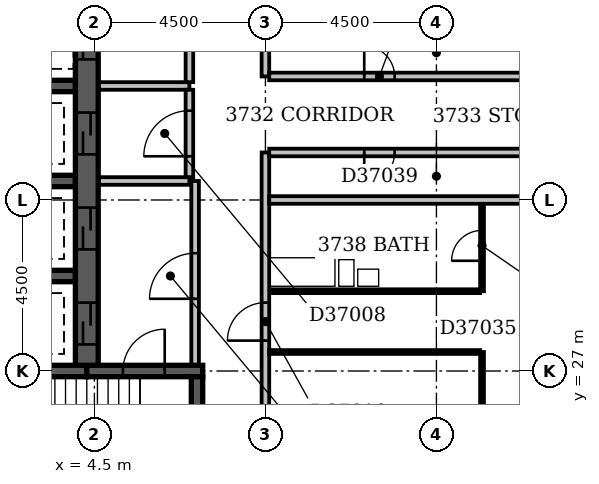
"""IFC4 building model, lengths in metres.
Left out: names, types, materials, properties, quantities, classifications, styles, units other than length and angle.
Written with IfcOpenShell. Run it as: python <this file> out.ifc"""

import sys

from ifc_helpers import new_model, si_unit, direction, frame, frame_2d, origin, place, context, subcontext, project, spatial, rectangle, extrude, element, fill, save


model = new_model("IFC4")
c1 = context("Model", 3, precision=1e-05, world=origin(), true_north=direction((0.0, 1.0)))
c2 = subcontext(c1, "Body", "Model", "MODEL_VIEW")
j1 = project(units=[si_unit("LENGTHUNIT", "METRE"), si_unit("PLANEANGLEUNIT", "RADIAN")], contexts=[c1])
p1 = place(None, origin())
s1 = spatial("IfcSite", under=j1, at=p1, CompositionType="ELEMENT")
p2 = place(p1, origin())
s2 = spatial("IfcBuilding", under=s1, at=p2, CompositionType="ELEMENT")
p3 = place(p2, frame((0.0, 0.0, 148.4)))
s3 = spatial("IfcBuildingStorey", under=s2, at=p3, CompositionType="ELEMENT", Elevation=148.4)
p4 = place(p3, frame((0.35, 27.0, -0.3), z_axis=(0.0, 0.0, 1.0), x_axis=(1.0, 0.0, 0.0)))
e1 = element("IfcWall", 1, at=p4, inside=s3, PredefinedType="SHEAR", context=c2, shape_type="SweptSolid", body=[
    extrude(rectangle(XDim=3.95, YDim=0.3, at=frame_2d((1.975, 0.0))), origin(), (0.0, 0.0, 1.0), 3.6),
])
for number, where, z_axis, x_axis in (
    (2, (0.8, 29.5, -0.3), (0.0, 0.0, 1.0), (1.0, 0.0, 0.0)),
    (3, (0.8, 32.0, -0.3), (0.0, 0.0, 1.0), (1.0, 0.0, 0.0)),
    (4, (0.8, 34.5, -0.3), (0.0, 0.0, 1.0), (1.0, 0.0, 0.0)),
):
    element("IfcWall", number, at=place(p3, frame(where, z_axis=z_axis, x_axis=x_axis)), inside=s3, PredefinedType="SHEAR", context=c2, shape_type="SweptSolid", body=[
        extrude(rectangle(XDim=3.2, YDim=0.3, at=frame_2d((1.6, 0.0))), origin(), (0.0, 0.0, 1.0), 3.6),
    ])
p5 = place(p3, frame((4.3, 27.0, -0.3), z_axis=(0.0, 0.0, 1.0), x_axis=(1.0, 0.0, 0.0)))
e5 = element("IfcWall", 5, at=p5, inside=s3, PredefinedType="SHEAR", context=c2, shape_type="SweptSolid", body=[
    extrude(rectangle(XDim=3.05, YDim=0.3, at=frame_2d((1.525, 0.0))), origin(), (0.0, 0.0, 1.0), 3.6),
])
p6 = place(p5, frame((0.95, 0.0, 0.3)))
e6 = element("IfcOpeningElement", 6, at=p6, cuts=e5, PredefinedType="OPENING", context=c2, shape_type="SweptSolid", body=[
    extrude(rectangle(XDim=1.1, YDim=2.1, at=frame_2d((0.55, 1.05))), frame((0.0, 0.162, 0.0), z_axis=(0.0, -1.0, 0.0), x_axis=(1.0, 0.0, 0.0)), (0.0, 0.0, 1.0), 0.324),
])
p7 = place(p3, frame((4.3, 27.15, -0.3), z_axis=(0.0, 0.0, 1.0), x_axis=(0.0, 1.0, 0.0)))
e7 = element("IfcWall", 7, at=p7, inside=s3, PredefinedType="SHEAR", context=c2, shape_type="SweptSolid", body=[
    extrude(rectangle(XDim=22.05, YDim=0.6, at=frame_2d((11.025, 0.0))), origin(), (0.0, 0.0, 1.0), 3.6),
])
p8 = place(p7, frame((3.05, 0.0, 0.3)))
e8 = element("IfcOpeningElement", 8, at=p8, cuts=e7, PredefinedType="OPENING", context=c2, shape_type="SweptSolid", body=[
    extrude(rectangle(XDim=1.1, YDim=2.1, at=frame_2d((0.55, 1.05))), frame((0.0, 0.312, 0.0), z_axis=(0.0, -1.0, 0.0), x_axis=(1.0, 0.0, 0.0)), (0.0, 0.0, 1.0), 0.624),
])
p9 = place(p7, frame((0.55, 0.0, 0.3)))
e9 = element("IfcOpeningElement", 9, at=p9, cuts=e7, PredefinedType="OPENING", context=c2, shape_type="SweptSolid", body=[
    extrude(rectangle(XDim=1.1, YDim=2.1, at=frame_2d((0.55, 1.05))), frame((0.0, 0.312, 0.0), z_axis=(0.0, -1.0, 0.0), x_axis=(1.0, 0.0, 0.0)), (0.0, 0.0, 1.0), 0.624),
])
p10 = place(p7, frame((20.55, 0.0, 0.3)))
e10 = element("IfcOpeningElement", 10, at=p10, cuts=e7, PredefinedType="OPENING", context=c2, shape_type="SweptSolid", body=[
    extrude(rectangle(XDim=1.1, YDim=2.1, at=frame_2d((0.55, 1.05))), frame((0.0, 0.312, 0.0), z_axis=(0.0, -1.0, 0.0), x_axis=(1.0, 0.0, 0.0)), (0.0, 0.0, 1.0), 0.624),
])
p11 = place(p7, frame((18.05, 0.0, 0.3)))
e11 = element("IfcOpeningElement", 11, at=p11, cuts=e7, PredefinedType="OPENING", context=c2, shape_type="SweptSolid", body=[
    extrude(rectangle(XDim=1.1, YDim=2.1, at=frame_2d((0.55, 1.05))), frame((0.0, 0.312, 0.0), z_axis=(0.0, -1.0, 0.0), x_axis=(1.0, 0.0, 0.0)), (0.0, 0.0, 1.0), 0.624),
])
p12 = place(p7, frame((15.55, 0.0, 0.3)))
e12 = element("IfcOpeningElement", 12, at=p12, cuts=e7, PredefinedType="OPENING", context=c2, shape_type="SweptSolid", body=[
    extrude(rectangle(XDim=1.1, YDim=2.1, at=frame_2d((0.55, 1.05))), frame((0.0, 0.312, 0.0), z_axis=(0.0, -1.0, 0.0), x_axis=(1.0, 0.0, 0.0)), (0.0, 0.0, 1.0), 0.624),
])
p13 = place(p7, frame((13.05, 0.0, 0.3)))
e13 = element("IfcOpeningElement", 13, at=p13, cuts=e7, PredefinedType="OPENING", context=c2, shape_type="SweptSolid", body=[
    extrude(rectangle(XDim=1.1, YDim=2.1, at=frame_2d((0.55, 1.05))), frame((0.0, 0.312, 0.0), z_axis=(0.0, -1.0, 0.0), x_axis=(1.0, 0.0, 0.0)), (0.0, 0.0, 1.0), 0.624),
])
p14 = place(p7, frame((10.55, 0.0, 0.3)))
e14 = element("IfcOpeningElement", 14, at=p14, cuts=e7, PredefinedType="OPENING", context=c2, shape_type="SweptSolid", body=[
    extrude(rectangle(XDim=1.1, YDim=2.1, at=frame_2d((0.55, 1.05))), frame((0.0, 0.312, 0.0), z_axis=(0.0, -1.0, 0.0), x_axis=(1.0, 0.0, 0.0)), (0.0, 0.0, 1.0), 0.624),
])
p15 = place(p7, frame((8.05, 0.0, 0.3)))
e15 = element("IfcOpeningElement", 15, at=p15, cuts=e7, PredefinedType="OPENING", context=c2, shape_type="SweptSolid", body=[
    extrude(rectangle(XDim=1.1, YDim=2.1, at=frame_2d((0.55, 1.05))), frame((0.0, 0.312, 0.0), z_axis=(0.0, -1.0, 0.0), x_axis=(1.0, 0.0, 0.0)), (0.0, 0.0, 1.0), 0.624),
])
p16 = place(p7, frame((5.55, 0.0, 0.3)))
e16 = element("IfcOpeningElement", 16, at=p16, cuts=e7, PredefinedType="OPENING", context=c2, shape_type="SweptSolid", body=[
    extrude(rectangle(XDim=1.1, YDim=2.1, at=frame_2d((0.55, 1.05))), frame((0.0, 0.312, 0.0), z_axis=(0.0, -1.0, 0.0), x_axis=(1.0, 0.0, 0.0)), (0.0, 0.0, 1.0), 0.624),
])
p17 = place(p3, frame((7.2, 22.65, -0.3), z_axis=(0.0, 0.0, 1.0), x_axis=(0.0, 1.0, 0.0)))
e17 = element("IfcWall", 17, at=p17, inside=s3, PredefinedType="SHEAR", context=c2, shape_type="SweptSolid", body=[
    extrude(rectangle(XDim=4.2, YDim=0.3, at=frame_2d((2.1, 0.0))), origin(), (0.0, 0.0, 1.0), 3.6),
])
p18 = place(p17, frame((0.8, 0.0, 0.3)))
e18 = element("IfcOpeningElement", 18, at=p18, cuts=e17, PredefinedType="OPENING", context=c2, shape_type="SweptSolid", body=[
    extrude(rectangle(XDim=1.1, YDim=2.1, at=frame_2d((0.55, 1.05))), frame((0.0, 0.162, 0.0), z_axis=(0.0, -1.0, 0.0), x_axis=(1.0, 0.0, 0.0)), (0.0, 0.0, 1.0), 0.324),
])
p19 = place(p3, frame((4.62, 34.5, 0.0), z_axis=(0.0, 0.0, 1.0), x_axis=(1.0, 0.0, 0.0)))
e19 = element("IfcWall", 19, at=p19, inside=s3, PredefinedType="PARTITIONING", context=c2, shape_type="SweptSolid", body=[
    extrude(rectangle(XDim=2.38, YDim=0.2, at=frame_2d((1.19, 0.0))), origin(), (0.0, 0.0, 1.0), 3.3),
])
p20 = place(p3, frame((7.0, 34.6, 0.0), z_axis=(0.0, 0.0, 1.0), x_axis=(0.0, 1.0, 0.0)))
e20 = element("IfcWall", 20, at=p20, inside=s3, PredefinedType="PARTITIONING", context=c2, shape_type="SweptSolid", body=[
    extrude(rectangle(XDim=14.9, YDim=0.2, at=frame_2d((7.45, 0.0))), origin(), (0.0, 0.0, 1.0), 3.3),
])
p21 = place(p20, frame((2.8, 0.0, 0.0)))
e21 = element("IfcOpeningElement", 21, at=p21, cuts=e20, PredefinedType="OPENING", context=c2, shape_type="SweptSolid", body=[
    extrude(rectangle(XDim=1.2, YDim=2.1, at=frame_2d((0.6, 1.05))), frame((0.0, 0.112, 0.0), z_axis=(0.0, -1.0, 0.0), x_axis=(1.0, 0.0, 0.0)), (0.0, 0.0, 1.0), 0.224),
])
p22 = place(p20, frame((9.8, 0.0, 0.0)))
e22 = element("IfcOpeningElement", 22, at=p22, cuts=e20, PredefinedType="OPENING", context=c2, shape_type="SweptSolid", body=[
    extrude(rectangle(XDim=1.2, YDim=2.1, at=frame_2d((0.6, 1.05))), frame((0.0, 0.112, 0.0), z_axis=(0.0, -1.0, 0.0), x_axis=(1.0, 0.0, 0.0)), (0.0, 0.0, 1.0), 0.224),
])
p23 = place(p3, frame((4.62, 32.0, 0.0), z_axis=(0.0, 0.0, 1.0), x_axis=(1.0, 0.0, 0.0)))
e23 = element("IfcWall", 23, at=p23, inside=s3, PredefinedType="PARTITIONING", context=c2, shape_type="SweptSolid", body=[
    extrude(rectangle(XDim=2.38, YDim=0.2, at=frame_2d((1.19, 0.0))), origin(), (0.0, 0.0, 1.0), 3.3),
])
p24 = place(p3, frame((7.0, 32.1, 0.0), z_axis=(0.0, 0.0, 1.0), x_axis=(0.0, 1.0, 0.0)))
e24 = element("IfcWall", 24, at=p24, inside=s3, PredefinedType="PARTITIONING", context=c2, shape_type="SweptSolid", body=[
    extrude(rectangle(XDim=2.3, YDim=0.2, at=frame_2d((1.15, 0.0))), origin(), (0.0, 0.0, 1.0), 3.3),
])
p25 = place(p24, frame((0.55, 0.0, 0.0)))
e25 = element("IfcOpeningElement", 25, at=p25, cuts=e24, PredefinedType="OPENING", context=c2, shape_type="SweptSolid", body=[
    extrude(rectangle(XDim=1.2, YDim=2.1, at=frame_2d((0.6, 1.05))), frame((0.0, 0.112, 0.0), z_axis=(0.0, -1.0, 0.0), x_axis=(1.0, 0.0, 0.0)), (0.0, 0.0, 1.0), 0.224),
])
p26 = place(p3, frame((7.15, 27.17, 0.0), z_axis=(0.0, 0.0, 1.0), x_axis=(0.0, 1.0, 0.0)))
e26 = element("IfcWall", 26, at=p26, inside=s3, PredefinedType="PARTITIONING", context=c2, shape_type="SweptSolid", body=[
    extrude(rectangle(XDim=4.83, YDim=0.2, at=frame_2d((2.415, 0.0))), origin(), (0.0, 0.0, 1.0), 3.3),
])
p27 = place(p26, frame((1.73, 0.0, 0.0)))
e27 = element("IfcOpeningElement", 27, at=p27, cuts=e26, PredefinedType="OPENING", context=c2, shape_type="SweptSolid", body=[
    extrude(rectangle(XDim=1.2, YDim=2.1, at=frame_2d((0.6, 1.05))), frame((0.0, 0.112, 0.0), z_axis=(0.0, -1.0, 0.0), x_axis=(1.0, 0.0, 0.0)), (0.0, 0.0, 1.0), 0.224),
])
p28 = place(p3, frame((9.0, 5.0, 0.0), z_axis=(0.0, 0.0, 1.0), x_axis=(0.0, 1.0, 0.0)))
e28 = element("IfcWall", 28, at=p28, inside=s3, PredefinedType="PARTITIONING", context=c2, shape_type="SweptSolid", body=[
    extrude(rectangle(XDim=27.75, YDim=0.2, at=frame_2d((13.875, 0.0))), origin(), (0.0, 0.0, 1.0), 3.3),
])
p29 = place(p28, frame((22.8, 0.0, 0.0)))
e29 = element("IfcOpeningElement", 29, at=p29, cuts=e28, PredefinedType="OPENING", context=c2, shape_type="SweptSolid", body=[
    extrude(rectangle(XDim=1.0, YDim=2.1, at=frame_2d((0.5, 1.05))), frame((0.0, 0.112, 0.0), z_axis=(0.0, -1.0, 0.0), x_axis=(1.0, 0.0, 0.0)), (0.0, 0.0, 1.0), 0.224),
])
p30 = place(p28, frame((14.95, 0.0, 0.0)))
e30 = element("IfcOpeningElement", 30, at=p30, cuts=e28, PredefinedType="OPENING", context=c2, shape_type="SweptSolid", body=[
    extrude(rectangle(XDim=1.0, YDim=2.1, at=frame_2d((0.5, 1.05))), frame((0.0, 0.112, 0.0), z_axis=(0.0, -1.0, 0.0), x_axis=(1.0, 0.0, 0.0)), (0.0, 0.0, 1.0), 0.224),
])
p31 = place(p28, frame((10.45, 0.0, 0.0)))
e31 = element("IfcOpeningElement", 31, at=p31, cuts=e28, PredefinedType="OPENING", context=c2, shape_type="SweptSolid", body=[
    extrude(rectangle(XDim=1.0, YDim=2.1, at=frame_2d((0.5, 1.05))), frame((0.0, 0.112, 0.0), z_axis=(0.0, -1.0, 0.0), x_axis=(1.0, 0.0, 0.0)), (0.0, 0.0, 1.0), 0.224),
])
p32 = place(p28, frame((5.95, 0.0, 0.0)))
e32 = element("IfcOpeningElement", 32, at=p32, cuts=e28, PredefinedType="OPENING", context=c2, shape_type="SweptSolid", body=[
    extrude(rectangle(XDim=1.0, YDim=2.1, at=frame_2d((0.5, 1.05))), frame((0.0, 0.112, 0.0), z_axis=(0.0, -1.0, 0.0), x_axis=(1.0, 0.0, 0.0)), (0.0, 0.0, 1.0), 0.224),
])
p33 = place(p28, frame((1.5, 0.0, 0.0)))
e33 = element("IfcOpeningElement", 33, at=p33, cuts=e28, PredefinedType="OPENING", context=c2, shape_type="SweptSolid", body=[
    extrude(rectangle(XDim=0.9, YDim=2.1, at=frame_2d((0.45, 1.05))), frame((0.0, 0.112, 0.0), z_axis=(0.0, -1.0, 0.0), x_axis=(1.0, 0.0, 0.0)), (0.0, 0.0, 1.0), 0.224),
])
p34 = place(p3, frame((14.7, 22.6, 0.0), z_axis=(0.0, 0.0, 1.0), x_axis=(0.0, 1.0, 0.0)))
e34 = element("IfcWall", 34, at=p34, inside=s3, PredefinedType="PARTITIONING", context=c2, shape_type="SweptSolid", body=[
    extrude(rectangle(XDim=4.9, YDim=0.1, at=frame_2d((2.45, 0.0))), origin(), (0.0, 0.0, 1.0), 3.3),
])
p35 = place(p34, frame((1.95, 0.0, 0.0)))
e35 = element("IfcOpeningElement", 35, at=p35, cuts=e34, PredefinedType="OPENING", context=c2, shape_type="SweptSolid", body=[
    extrude(rectangle(XDim=0.9, YDim=2.1, at=frame_2d((0.45, 1.05))), frame((0.0, 0.062, 0.0), z_axis=(0.0, -1.0, 0.0), x_axis=(1.0, 0.0, 0.0)), (0.0, 0.0, 1.0), 0.124),
])
p36 = place(p3, frame((9.1, 27.5, 0.0), z_axis=(0.0, 0.0, 1.0), x_axis=(1.0, 0.0, 0.0)))
e36 = element("IfcWall", 36, at=p36, inside=s3, PredefinedType="PARTITIONING", context=c2, shape_type="SweptSolid", body=[
    extrude(rectangle(XDim=5.55, YDim=0.1, at=frame_2d((2.775, 0.0))), origin(), (0.0, 0.0, 1.0), 2.7),
])
p37 = place(p3, frame((9.1, 29.1, 0.0), z_axis=(0.0, 0.0, 1.0), x_axis=(1.0, 0.0, 0.0)))
e37 = element("IfcWall", 37, at=p37, inside=s3, PredefinedType="PLUMBINGWALL", context=c2, shape_type="SweptSolid", body=[
    extrude(rectangle(XDim=5.55, YDim=0.1, at=frame_2d((2.775, 0.0))), origin(), (0.0, 0.0, 1.0), 3.3),
])
p38 = place(p3, frame((14.7, 29.1, 0.0), z_axis=(0.0, 0.0, 1.0), x_axis=(0.0, 1.0, 0.0)))
e38 = element("IfcWall", 38, at=p38, inside=s3, PredefinedType="PARTITIONING", context=c2, shape_type="SweptSolid", body=[
    extrude(rectangle(XDim=2.3, YDim=0.1, at=frame_2d((1.15, 0.0))), origin(), (0.0, 0.0, 1.0), 3.3),
])
p39 = place(p38, frame((0.8, 0.0, 0.0)))
e39 = element("IfcOpeningElement", 39, at=p39, cuts=e38, PredefinedType="OPENING", context=c2, shape_type="SweptSolid", body=[
    extrude(rectangle(XDim=0.8, YDim=2.1, at=frame_2d((0.4, 1.05))), frame((0.0, 0.062, 0.0), z_axis=(0.0, -1.0, 0.0), x_axis=(1.0, 0.0, 0.0)), (0.0, 0.0, 1.0), 0.124),
])
p40 = place(p3, frame((9.1, 31.5, 0.0), z_axis=(0.0, 0.0, 1.0), x_axis=(1.0, 0.0, 0.0)))
e40 = element("IfcWall", 40, at=p40, inside=s3, PredefinedType="PARTITIONING", context=c2, shape_type="SweptSolid", body=[
    extrude(rectangle(XDim=12.9, YDim=0.2, at=frame_2d((6.45, 0.0))), origin(), (0.0, 0.0, 1.0), 3.3),
])
p41 = place(p3, frame((9.1, 32.75, 0.0), z_axis=(0.0, 0.0, 1.0), x_axis=(1.0, 0.0, 0.0)))
e41 = element("IfcWall", 41, at=p41, inside=s3, PredefinedType="PARTITIONING", context=c2, shape_type="SweptSolid", body=[
    extrude(rectangle(XDim=8.85, YDim=0.2, at=frame_2d((4.425, 0.0))), origin(), (0.0, 0.0, 1.0), 3.3),
])
p42 = place(p41, frame((2.5, 0.0, 0.0)))
e42 = element("IfcOpeningElement", 42, at=p42, cuts=e41, PredefinedType="OPENING", context=c2, shape_type="SweptSolid", body=[
    extrude(rectangle(XDim=0.8, YDim=2.1, at=frame_2d((0.4, 1.05))), frame((0.0, 0.112, 0.0), z_axis=(0.0, -1.0, 0.0), x_axis=(1.0, 0.0, 0.0)), (0.0, 0.0, 1.0), 0.224),
])
p43 = place(p3, frame((9.0, 34.75, 0.0), z_axis=(0.0, 0.0, 1.0), x_axis=(0.0, 1.0, 0.0)))
e43 = element("IfcWall", 43, at=p43, inside=s3, PredefinedType="PARTITIONING", context=c2, shape_type="SweptSolid", body=[
    extrude(rectangle(XDim=14.75, YDim=0.2, at=frame_2d((7.375, 0.0))), origin(), (0.0, 0.0, 1.0), 3.3),
])
p44 = place(p43, frame((7.5, 0.0, 0.0)))
e44 = element("IfcOpeningElement", 44, at=p44, cuts=e43, PredefinedType="OPENING", context=c2, shape_type="SweptSolid", body=[
    extrude(rectangle(XDim=0.9, YDim=2.1, at=frame_2d((0.45, 1.05))), frame((0.0, 0.112, 0.0), z_axis=(0.0, -1.0, 0.0), x_axis=(1.0, 0.0, 0.0)), (0.0, 0.0, 1.0), 0.224),
])
p45 = place(p3, frame((9.1, 34.75, 0.0), z_axis=(0.0, 0.0, 1.0), x_axis=(1.0, 0.0, 0.0)))
e45 = element("IfcWall", 45, at=p45, inside=s3, PredefinedType="PARTITIONING", context=c2, shape_type="SweptSolid", body=[
    extrude(rectangle(XDim=8.85, YDim=0.2, at=frame_2d((4.425, 0.0))), origin(), (0.0, 0.0, 1.0), 3.3),
])
p46 = place(p45, frame((2.5, 0.0, 0.0)))
e46 = element("IfcOpeningElement", 46, at=p46, cuts=e45, PredefinedType="OPENING", context=c2, shape_type="SweptSolid", body=[
    extrude(rectangle(XDim=0.8, YDim=2.1, at=frame_2d((0.4, 1.05))), frame((0.0, 0.112, 0.0), z_axis=(0.0, -1.0, 0.0), x_axis=(1.0, 0.0, 0.0)), (0.0, 0.0, 1.0), 0.224),
])
p47 = place(p27, origin())
e47 = element("IfcDoor", 47, at=p47, inside=s3, OperationType="SINGLE_SWING_LEFT", PredefinedType="DOOR", context=c2, shape_type="SweptSolid", body=[
    extrude(rectangle(XDim=1.2, YDim=2.1, at=frame_2d((0.6, 1.05))), frame((0.0, 0.025, 0.0), z_axis=(0.0, -1.0, 0.0), x_axis=(1.0, 0.0, 0.0)), (0.0, 0.0, 1.0), 0.05),
])
fill(e27, e47)
p48 = place(p8, origin())
e48 = element("IfcDoor", 48, at=p48, inside=s3, OperationType="SLIDING_TO_LEFT", PredefinedType="DOOR", context=c2, shape_type="SweptSolid", body=[
    extrude(rectangle(XDim=1.1, YDim=2.1, at=frame_2d((0.55, 1.05))), frame((0.0, 0.025, 0.0), z_axis=(0.0, -1.0, 0.0), x_axis=(1.0, 0.0, 0.0)), (0.0, 0.0, 1.0), 0.05),
])
fill(e8, e48)
p49 = place(p9, origin())
e49 = element("IfcDoor", 49, at=p49, inside=s3, OperationType="SLIDING_TO_LEFT", PredefinedType="DOOR", context=c2, shape_type="SweptSolid", body=[
    extrude(rectangle(XDim=1.1, YDim=2.1, at=frame_2d((0.55, 1.05))), frame((0.0, 0.025, 0.0), z_axis=(0.0, -1.0, 0.0), x_axis=(1.0, 0.0, 0.0)), (0.0, 0.0, 1.0), 0.05),
])
fill(e9, e49)
p50 = place(p15, origin())
e50 = element("IfcDoor", 50, at=p50, inside=s3, OperationType="SLIDING_TO_LEFT", PredefinedType="DOOR", context=c2, shape_type="SweptSolid", body=[
    extrude(rectangle(XDim=1.1, YDim=2.1, at=frame_2d((0.55, 1.05))), frame((0.0, 0.025, 0.0), z_axis=(0.0, -1.0, 0.0), x_axis=(1.0, 0.0, 0.0)), (0.0, 0.0, 1.0), 0.05),
])
fill(e15, e50)
p51 = place(p25, origin())
e51 = element("IfcDoor", 51, at=p51, inside=s3, OperationType="SINGLE_SWING_LEFT", PredefinedType="DOOR", context=c2, shape_type="SweptSolid", body=[
    extrude(rectangle(XDim=1.2, YDim=2.1, at=frame_2d((0.6, 1.05))), frame((0.0, 0.025, 0.0), z_axis=(0.0, -1.0, 0.0), x_axis=(1.0, 0.0, 0.0)), (0.0, 0.0, 1.0), 0.05),
])
fill(e25, e51)
p52 = place(p16, origin())
e52 = element("IfcDoor", 52, at=p52, inside=s3, OperationType="SLIDING_TO_LEFT", PredefinedType="DOOR", context=c2, shape_type="SweptSolid", body=[
    extrude(rectangle(XDim=1.1, YDim=2.1, at=frame_2d((0.55, 1.05))), frame((0.0, 0.025, 0.0), z_axis=(0.0, -1.0, 0.0), x_axis=(1.0, 0.0, 0.0)), (0.0, 0.0, 1.0), 0.05),
])
fill(e16, e52)
p53 = place(p6, frame((1.1, 0.0, 0.0), z_axis=(0.0, 0.0, 1.0), x_axis=(-1.0, 0.0, 0.0)))
e53 = element("IfcDoor", 53, at=p53, inside=s3, OperationType="SINGLE_SWING_LEFT", PredefinedType="DOOR", context=c2, shape_type="SweptSolid", body=[
    extrude(rectangle(XDim=1.1, YDim=2.1, at=frame_2d((0.55, 1.05))), frame((0.0, 0.025, 0.0), z_axis=(0.0, -1.0, 0.0), x_axis=(1.0, 0.0, 0.0)), (0.0, 0.0, 1.0), 0.05),
])
fill(e6, e53)
p54 = place(p29, origin())
e54 = element("IfcDoor", 54, at=p54, inside=s3, OperationType="SINGLE_SWING_LEFT", PredefinedType="DOOR", context=c2, shape_type="SweptSolid", body=[
    extrude(rectangle(XDim=1.0, YDim=2.1, at=frame_2d((0.5, 1.05))), frame((0.0, 0.025, 0.0), z_axis=(0.0, -1.0, 0.0), x_axis=(1.0, 0.0, 0.0)), (0.0, 0.0, 1.0), 0.05),
])
fill(e29, e54)
p55 = place(p39, origin())
e55 = element("IfcDoor", 55, at=p55, inside=s3, OperationType="SINGLE_SWING_LEFT", PredefinedType="DOOR", context=c2, shape_type="SweptSolid", body=[
    extrude(rectangle(XDim=0.8, YDim=2.1, at=frame_2d((0.4, 1.05))), frame((0.0, 0.025, 0.0), z_axis=(0.0, -1.0, 0.0), x_axis=(1.0, 0.0, 0.0)), (0.0, 0.0, 1.0), 0.05),
])
fill(e39, e55)
p56 = place(p42, frame((0.8, 0.0, 0.0), z_axis=(0.0, 0.0, 1.0), x_axis=(-1.0, 0.0, 0.0)))
e56 = element("IfcDoor", 56, at=p56, inside=s3, OperationType="SINGLE_SWING_RIGHT", PredefinedType="DOOR", context=c2, shape_type="SweptSolid", body=[
    extrude(rectangle(XDim=0.8, YDim=2.1, at=frame_2d((0.4, 1.05))), frame((0.0, 0.025, 0.0), z_axis=(0.0, -1.0, 0.0), x_axis=(1.0, 0.0, 0.0)), (0.0, 0.0, 1.0), 0.05),
])
fill(e42, e56)
p57 = place(p46, origin())
e57 = element("IfcDoor", 57, at=p57, inside=s3, OperationType="SINGLE_SWING_LEFT", PredefinedType="DOOR", context=c2, shape_type="SweptSolid", body=[
    extrude(rectangle(XDim=0.8, YDim=2.1, at=frame_2d((0.4, 1.05))), frame((0.0, 0.025, 0.0), z_axis=(0.0, -1.0, 0.0), x_axis=(1.0, 0.0, 0.0)), (0.0, 0.0, 1.0), 0.05),
])
fill(e46, e57)
save(model, sys.argv[1])
